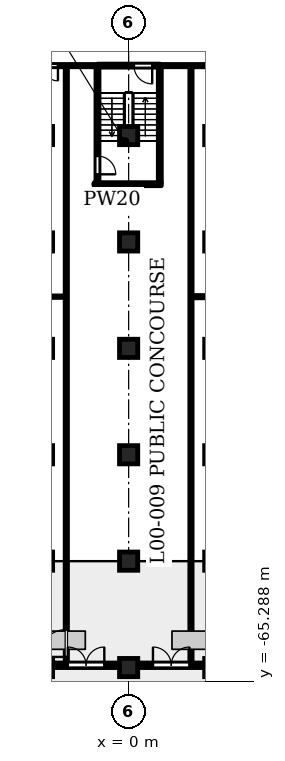
"""IFC4 building model, lengths in metres.
Left out: names, types, materials, properties, quantities, classifications, styles, units other than length and angle.
Written with IfcOpenShell. Run it as: python <this file> out.ifc"""

import sys

from ifc_helpers import new_model, si_unit, direction, frame, frame_2d, origin, origin_2d, place, context, subcontext, project, spatial, rectangle, circle, extrude, element, fill, save


model = new_model("IFC4")
c1 = context("Model", 3, precision=1e-05, world=origin(), true_north=direction((0.0, 1.0)))
c2 = subcontext(c1, "Body", "Model", "MODEL_VIEW")
j1 = project(units=[si_unit("LENGTHUNIT", "METRE"), si_unit("PLANEANGLEUNIT", "RADIAN")], contexts=[c1])
p1 = place(None, origin())
s1 = spatial("IfcSite", under=j1, at=p1, CompositionType="ELEMENT")
p2 = place(p1, origin())
s2 = spatial("IfcBuilding", under=s1, at=p2, CompositionType="ELEMENT")
p3 = place(p2, origin())
s3 = spatial("IfcBuildingStorey", under=s2, at=p3, CompositionType="ELEMENT", Elevation=0.0)
for number, where, z_axis, x_axis in (
    (1, (-5.6, -29.4, 0.0), (0.0, 0.0, 1.0), (1.0, 0.0, 0.0)),
    (2, (0.0, -29.4, 0.0), (0.0, 0.0, 1.0), (1.0, 0.0, 0.0)),
    (3, (5.6, -29.4, 0.0), (0.0, 0.0, 1.0), (1.0, 0.0, 0.0)),
    (4, (-5.6, -36.4, 0.0), (0.0, 0.0, 1.0), (1.0, 0.0, 0.0)),
    (5, (0.0, -36.4, 0.0), (0.0, 0.0, 1.0), (1.0, 0.0, 0.0)),
    (6, (5.6, -36.4, 0.0), (0.0, 0.0, 1.0), (1.0, 0.0, 0.0)),
    (7, (-5.6, -43.4, 0.0), (0.0, 0.0, 1.0), (1.0, 0.0, 0.0)),
    (8, (0.0, -43.4, 0.0), (0.0, 0.0, 1.0), (1.0, 0.0, 0.0)),
    (9, (5.6, -43.4, 0.0), (0.0, 0.0, 1.0), (1.0, 0.0, 0.0)),
    (10, (-5.6, -50.4, 0.0), (0.0, 0.0, 1.0), (1.0, 0.0, 0.0)),
    (11, (0.0, -50.4, 0.0), (0.0, 0.0, 1.0), (1.0, 0.0, 0.0)),
    (12, (5.6, -50.4, 0.0), (0.0, 0.0, 1.0), (1.0, 0.0, 0.0)),
    (13, (-5.6, -57.4, 0.0), (0.0, 0.0, 1.0), (1.0, 0.0, 0.0)),
    (14, (0.0, -57.4, 0.0), (0.0, 0.0, 1.0), (1.0, 0.0, 0.0)),
    (15, (5.6, -57.4, 0.0), (0.0, 0.0, 1.0), (1.0, 0.0, 0.0)),
    (16, (-5.6, -64.4, 0.0), (0.0, 0.0, 1.0), (1.0, 0.0, 0.0)),
    (17, (0.0, -64.4, 0.0), (0.0, 0.0, 1.0), (1.0, 0.0, 0.0)),
    (18, (5.6, -64.4, 0.0), (0.0, 0.0, 1.0), (1.0, 0.0, 0.0)),
):
    element("IfcColumn", number, at=place(p3, frame(where, z_axis=z_axis, x_axis=x_axis)), inside=s3, PredefinedType="COLUMN", context=c2, shape_type="SweptSolid", body=[
        extrude(circle(Radius=0.6, at=origin_2d()), origin(), (0.0, 0.0, 1.0), 6.5),
    ])
p4 = place(p3, frame((-5.0, -64.25, 0.0), z_axis=(0.0, 0.0, 1.0), x_axis=(1.0, 0.0, 0.0)))
e19 = element("IfcWall", 19, at=p4, inside=s3, PredefinedType="SOLIDWALL", context=c2, shape_type="SweptSolid", body=[
    extrude(rectangle(XDim=4.4, YDim=0.3, at=frame_2d((2.2, 0.0))), origin(), (0.0, 0.0, 1.0), 5.35),
])
p5 = place(p4, frame((1.0, 0.0, 0.0)))
e20 = element("IfcOpeningElement", 20, at=p5, cuts=e19, PredefinedType="OPENING", context=c2, shape_type="SweptSolid", body=[
    extrude(rectangle(XDim=2.4, YDim=2.4, at=frame_2d((1.2, 1.2))), frame((0.0, 0.16, 0.0), z_axis=(0.0, -1.0, 0.0), x_axis=(1.0, 0.0, 0.0)), (0.0, 0.0, 1.0), 0.32),
])
p6 = place(p3, frame((0.6, -64.25, 0.0), z_axis=(0.0, 0.0, 1.0), x_axis=(1.0, 0.0, 0.0)))
e21 = element("IfcWall", 21, at=p6, inside=s3, PredefinedType="SOLIDWALL", context=c2, shape_type="SweptSolid", body=[
    extrude(rectangle(XDim=4.4, YDim=0.3, at=frame_2d((2.2, 0.0))), origin(), (0.0, 0.0, 1.0), 5.35),
])
p7 = place(p6, frame((1.0, 0.0, 0.0)))
e22 = element("IfcOpeningElement", 22, at=p7, cuts=e21, PredefinedType="OPENING", context=c2, shape_type="SweptSolid", body=[
    extrude(rectangle(XDim=2.4, YDim=2.4, at=frame_2d((1.2, 1.2))), frame((0.0, 0.16, 0.0), z_axis=(0.0, -1.0, 0.0), x_axis=(1.0, 0.0, 0.0)), (0.0, 0.0, 1.0), 0.32),
])
p8 = place(p3, frame((-44.618, -40.0, 0.0), z_axis=(0.0, 0.0, 1.0), x_axis=(1.0, 0.0, 0.0)))
e23 = element("IfcWall", 23, at=p8, inside=s3, PredefinedType="PARTITIONING", context=c2, shape_type="SweptSolid", body=[
    extrude(rectangle(XDim=40.443, YDim=0.1, at=frame_2d((20.221, 0.0))), origin(), (0.0, 0.0, 1.0), 6.15),
])
p9 = place(p3, frame((4.175, -40.0, 0.0), z_axis=(0.0, 0.0, 1.0), x_axis=(1.0, 0.0, 0.0)))
e24 = element("IfcWall", 24, at=p9, inside=s3, PredefinedType="PARTITIONING", context=c2, shape_type="SweptSolid", body=[
    extrude(rectangle(XDim=11.825, YDim=0.15, at=frame_2d((5.913, 0.0))), origin(), (0.0, 0.0, 1.0), 6.15),
])
p10 = place(p3, frame((-2.15, -32.6, 0.0), z_axis=(0.0, 0.0, 1.0), x_axis=(1.0, 0.0, 0.0)))
e25 = element("IfcWall", 25, at=p10, inside=s3, PredefinedType="SHEAR", context=c2, shape_type="SweptSolid", body=[
    extrude(rectangle(XDim=4.3, YDim=0.2, at=frame_2d((2.15, 0.0))), origin(), (0.0, 0.0, 1.0), 6.15),
])
p11 = place(p3, frame((-37.0, -24.8, 0.0), z_axis=(0.0, 0.0, 1.0), x_axis=(1.0, 0.0, 0.0)))
e26 = element("IfcWall", 26, at=p11, inside=s3, PredefinedType="PARTITIONING", context=c2, shape_type="SweptSolid", body=[
    extrude(rectangle(XDim=34.95, YDim=0.15, at=frame_2d((17.475, 0.0))), origin(), (0.0, 0.0, 1.0), 6.15),
])
p12 = place(p11, frame((0.65, 0.0, 0.0)))
e27 = element("IfcOpeningElement", 27, at=p12, cuts=e26, PredefinedType="OPENING", context=c2, shape_type="SweptSolid", body=[
    extrude(rectangle(XDim=1.0, YDim=2.1, at=frame_2d((0.5, 1.05))), frame((0.0, 0.085, 0.0), z_axis=(0.0, -1.0, 0.0), x_axis=(1.0, 0.0, 0.0)), (0.0, 0.0, 1.0), 0.17),
])
p13 = place(p11, frame((12.6, 0.0, 0.0)))
e28 = element("IfcOpeningElement", 28, at=p13, cuts=e26, PredefinedType="OPENING", context=c2, shape_type="SweptSolid", body=[
    extrude(rectangle(XDim=1.0, YDim=2.1, at=frame_2d((0.5, 1.05))), frame((0.0, 0.085, 0.0), z_axis=(0.0, -1.0, 0.0), x_axis=(1.0, 0.0, 0.0)), (0.0, 0.0, 1.0), 0.17),
])
p14 = place(p11, frame((14.85, 0.0, 0.0)))
e29 = element("IfcOpeningElement", 29, at=p14, cuts=e26, PredefinedType="OPENING", context=c2, shape_type="SweptSolid", body=[
    extrude(rectangle(XDim=1.0, YDim=2.1, at=frame_2d((0.5, 1.05))), frame((0.0, 0.085, 0.0), z_axis=(0.0, -1.0, 0.0), x_axis=(1.0, 0.0, 0.0)), (0.0, 0.0, 1.0), 0.17),
])
p15 = place(p11, frame((31.35, 0.0, 0.0)))
e30 = element("IfcOpeningElement", 30, at=p15, cuts=e26, PredefinedType="OPENING", context=c2, shape_type="SweptSolid", body=[
    extrude(rectangle(XDim=1.0, YDim=2.1, at=frame_2d((0.5, 1.05))), frame((0.0, 0.085, 0.0), z_axis=(0.0, -1.0, 0.0), x_axis=(1.0, 0.0, 0.0)), (0.0, 0.0, 1.0), 0.17),
])
p16 = place(p3, frame((2.05, -24.8, 0.0), z_axis=(0.0, 0.0, 1.0), x_axis=(1.0, 0.0, 0.0)))
e31 = element("IfcWall", 31, at=p16, inside=s3, PredefinedType="PARTITIONING", context=c2, shape_type="SweptSolid", body=[
    extrude(rectangle(XDim=34.95, YDim=0.15, at=frame_2d((17.475, 0.0))), origin(), (0.0, 0.0, 1.0), 6.15),
])
p17 = place(p16, frame((9.45, 0.0, 0.0)))
e32 = element("IfcOpeningElement", 32, at=p17, cuts=e31, PredefinedType="OPENING", context=c2, shape_type="SweptSolid", body=[
    extrude(rectangle(XDim=1.0, YDim=2.1, at=frame_2d((0.5, 1.05))), frame((0.0, 0.085, 0.0), z_axis=(0.0, -1.0, 0.0), x_axis=(1.0, 0.0, 0.0)), (0.0, 0.0, 1.0), 0.17),
])
p18 = place(p16, frame((11.7, 0.0, 0.0)))
e33 = element("IfcOpeningElement", 33, at=p18, cuts=e31, PredefinedType="OPENING", context=c2, shape_type="SweptSolid", body=[
    extrude(rectangle(XDim=1.0, YDim=2.1, at=frame_2d((0.5, 1.05))), frame((0.0, 0.085, 0.0), z_axis=(0.0, -1.0, 0.0), x_axis=(1.0, 0.0, 0.0)), (0.0, 0.0, 1.0), 0.17),
])
p19 = place(p16, frame((27.45, 0.0, 0.0)))
e34 = element("IfcOpeningElement", 34, at=p19, cuts=e31, PredefinedType="OPENING", context=c2, shape_type="SweptSolid", body=[
    extrude(rectangle(XDim=1.0, YDim=2.1, at=frame_2d((0.5, 1.05))), frame((0.0, 0.085, 0.0), z_axis=(0.0, -1.0, 0.0), x_axis=(1.0, 0.0, 0.0)), (0.0, 0.0, 1.0), 0.17),
])
p20 = place(p16, frame((29.7, 0.0, 0.0)))
e35 = element("IfcOpeningElement", 35, at=p20, cuts=e31, PredefinedType="OPENING", context=c2, shape_type="SweptSolid", body=[
    extrude(rectangle(XDim=1.0, YDim=2.1, at=frame_2d((0.5, 1.05))), frame((0.0, 0.085, 0.0), z_axis=(0.0, -1.0, 0.0), x_axis=(1.0, 0.0, 0.0)), (0.0, 0.0, 1.0), 0.17),
])
p21 = place(p3, frame((-2.05, -24.8, 0.0), z_axis=(0.0, 0.0, 1.0), x_axis=(1.0, 0.0, 0.0)))
e36 = element("IfcWall", 36, at=p21, inside=s3, PredefinedType="SHEAR", context=c2, shape_type="SweptSolid", body=[
    extrude(rectangle(XDim=4.1, YDim=0.2, at=frame_2d((2.05, 0.0))), origin(), (0.0, 0.0, 1.0), 6.15),
])
p22 = place(p21, frame((2.4, 0.0, 0.0)))
e37 = element("IfcOpeningElement", 37, at=p22, cuts=e36, PredefinedType="OPENING", context=c2, shape_type="SweptSolid", body=[
    extrude(rectangle(XDim=1.2, YDim=2.1, at=frame_2d((0.6, 1.05))), frame((0.0, 0.11, 0.0), z_axis=(0.0, -1.0, 0.0), x_axis=(1.0, 0.0, 0.0)), (0.0, 0.0, 1.0), 0.22),
])
p23 = place(p3, frame((-4.1, -64.08, 0.0), z_axis=(0.0, 0.0, 1.0), x_axis=(0.0, 1.0, 0.0)))
e38 = element("IfcWall", 38, at=p23, inside=s3, PredefinedType="PARTITIONING", context=c2, shape_type="SweptSolid", body=[
    extrude(rectangle(XDim=39.205, YDim=0.15, at=frame_2d((19.603, 0.0))), origin(), (0.0, 0.0, 1.0), 6.15),
])
p24 = place(p23, frame((0.38, 0.0, 0.0)))
e39 = element("IfcOpeningElement", 39, at=p24, cuts=e38, PredefinedType="OPENING", context=c2, shape_type="SweptSolid", body=[
    extrude(rectangle(XDim=1.8, YDim=2.1, at=frame_2d((0.9, 1.05))), frame((0.0, 0.085, 0.0), z_axis=(0.0, -1.0, 0.0), x_axis=(1.0, 0.0, 0.0)), (0.0, 0.0, 1.0), 0.17),
])
p25 = place(p3, frame((-2.05, -32.5, 0.0), z_axis=(0.0, 0.0, 1.0), x_axis=(0.0, 1.0, 0.0)))
e40 = element("IfcWall", 40, at=p25, inside=s3, PredefinedType="SHEAR", context=c2, shape_type="SweptSolid", body=[
    extrude(rectangle(XDim=7.625, YDim=0.2, at=frame_2d((3.812, 0.0))), origin(), (0.0, 0.0, 1.0), 6.15),
])
p26 = place(p25, frame((0.55, 0.0, 0.0)))
e41 = element("IfcOpeningElement", 41, at=p26, cuts=e40, PredefinedType="OPENING", context=c2, shape_type="SweptSolid", body=[
    extrude(rectangle(XDim=1.2, YDim=2.1, at=frame_2d((0.6, 1.05))), frame((0.0, 0.11, 0.0), z_axis=(0.0, -1.0, 0.0), x_axis=(1.0, 0.0, 0.0)), (0.0, 0.0, 1.0), 0.22),
])
p27 = place(p3, frame((2.05, -32.5, 0.0), z_axis=(0.0, 0.0, 1.0), x_axis=(0.0, 1.0, 0.0)))
e42 = element("IfcWall", 42, at=p27, inside=s3, PredefinedType="SHEAR", context=c2, shape_type="SweptSolid", body=[
    extrude(rectangle(XDim=7.625, YDim=0.2, at=frame_2d((3.812, 0.0))), origin(), (0.0, 0.0, 1.0), 6.15),
])
p28 = place(p3, frame((4.1, -64.08, 0.0), z_axis=(0.0, 0.0, 1.0), x_axis=(0.0, 1.0, 0.0)))
e43 = element("IfcWall", 43, at=p28, inside=s3, PredefinedType="PARTITIONING", context=c2, shape_type="SweptSolid", body=[
    extrude(rectangle(XDim=39.205, YDim=0.15, at=frame_2d((19.603, 0.0))), origin(), (0.0, 0.0, 1.0), 6.15),
])
p29 = place(p5, origin())
e44 = element("IfcDoor", 44, at=p29, inside=s3, OperationType="SINGLE_SWING_LEFT", PredefinedType="DOOR", context=c2, shape_type="SweptSolid", body=[
    extrude(rectangle(XDim=2.4, YDim=2.4, at=frame_2d((1.2, 1.2))), frame((0.0, 0.025, 0.0), z_axis=(0.0, -1.0, 0.0), x_axis=(1.0, 0.0, 0.0)), (0.0, 0.0, 1.0), 0.05),
])
fill(e20, e44)
p30 = place(p7, origin())
e45 = element("IfcDoor", 45, at=p30, inside=s3, OperationType="SINGLE_SWING_LEFT", PredefinedType="DOOR", context=c2, shape_type="SweptSolid", body=[
    extrude(rectangle(XDim=2.4, YDim=2.4, at=frame_2d((1.2, 1.2))), frame((0.0, 0.025, 0.0), z_axis=(0.0, -1.0, 0.0), x_axis=(1.0, 0.0, 0.0)), (0.0, 0.0, 1.0), 0.05),
])
fill(e22, e45)
p31 = place(p22, origin())
e46 = element("IfcDoor", 46, at=p31, inside=s3, OperationType="SINGLE_SWING_RIGHT", PredefinedType="DOOR", context=c2, shape_type="SweptSolid", body=[
    extrude(rectangle(XDim=1.2, YDim=2.1, at=frame_2d((0.6, 1.05))), frame((0.0, 0.025, 0.0), z_axis=(0.0, -1.0, 0.0), x_axis=(1.0, 0.0, 0.0)), (0.0, 0.0, 1.0), 0.05),
])
fill(e37, e46)
p32 = place(p26, origin())
e47 = element("IfcDoor", 47, at=p32, inside=s3, OperationType="SINGLE_SWING_LEFT", PredefinedType="DOOR", context=c2, shape_type="SweptSolid", body=[
    extrude(rectangle(XDim=1.2, YDim=2.1, at=frame_2d((0.6, 1.05))), frame((0.0, 0.025, 0.0), z_axis=(0.0, -1.0, 0.0), x_axis=(1.0, 0.0, 0.0)), (0.0, 0.0, 1.0), 0.05),
])
fill(e41, e47)
p33 = place(p24, origin())
e48 = element("IfcDoor", 48, at=p33, inside=s3, OperationType="SINGLE_SWING_RIGHT", PredefinedType="DOOR", context=c2, shape_type="SweptSolid", body=[
    extrude(rectangle(XDim=1.8, YDim=2.1, at=frame_2d((0.9, 1.05))), frame((0.0, 0.025, 0.0), z_axis=(0.0, -1.0, 0.0), x_axis=(1.0, 0.0, 0.0)), (0.0, 0.0, 1.0), 0.05),
])
fill(e39, e48)
p34 = place(p15, origin())
e49 = element("IfcDoor", 49, at=p34, inside=s3, OperationType="SINGLE_SWING_RIGHT", PredefinedType="DOOR", context=c2, shape_type="SweptSolid", body=[
    extrude(rectangle(XDim=1.0, YDim=2.1, at=frame_2d((0.5, 1.05))), frame((0.0, 0.025, 0.0), z_axis=(0.0, -1.0, 0.0), x_axis=(1.0, 0.0, 0.0)), (0.0, 0.0, 1.0), 0.05),
])
fill(e30, e49)
save(model, sys.argv[1])
